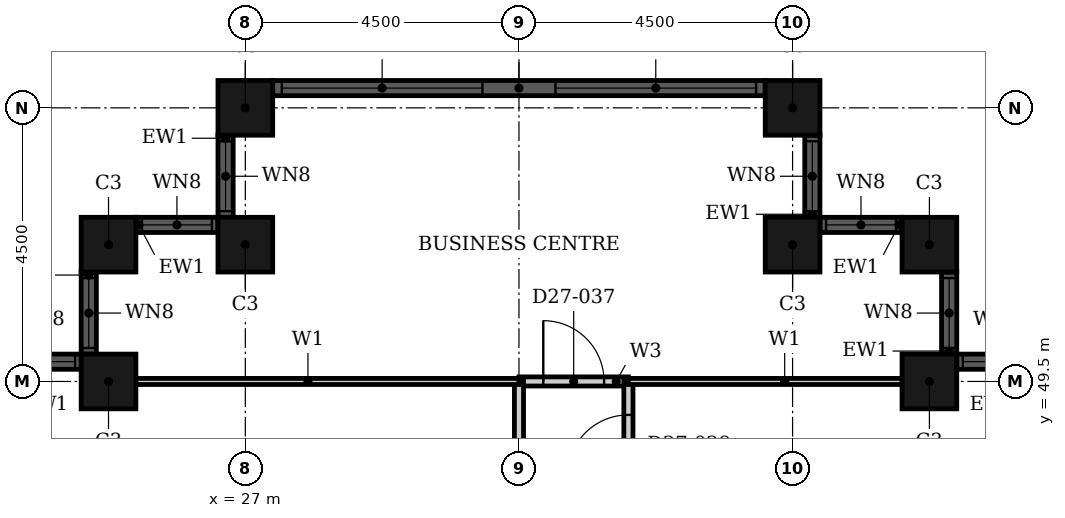
"""IFC4 building model, lengths in metres.
Left out: names, types, materials, properties, quantities, classifications, styles, units other than length and angle.
Written with IfcOpenShell. Run it as: python <this file> out.ifc"""

import sys

from ifc_helpers import new_model, si_unit, direction, frame, frame_2d, origin, origin_2d, place, context, subcontext, project, spatial, rectangle, hollow_rectangle, extrude, element, fill, save


model = new_model("IFC4")
c1 = context("Model", 3, precision=1e-05, world=origin(), true_north=direction((0.0, 1.0)))
c2 = subcontext(c1, "Body", "Model", "MODEL_VIEW")
j1 = project(units=[si_unit("LENGTHUNIT", "METRE"), si_unit("PLANEANGLEUNIT", "RADIAN")], contexts=[c1])
p1 = place(None, origin())
s1 = spatial("IfcSite", under=j1, at=p1, CompositionType="ELEMENT")
p2 = place(p1, origin())
s2 = spatial("IfcBuilding", under=s1, at=p2, CompositionType="ELEMENT")
p3 = place(p2, frame((0.0, 0.0, 111.6)))
s3 = spatial("IfcBuildingStorey", under=s2, at=p3, CompositionType="ELEMENT", Elevation=111.6)
for number, where, z_axis, x_axis in (
    (1, (38.25, 49.5, 0.0), (0.0, 0.0, 1.0), (1.0, 0.0, 0.0)),
    (2, (38.25, 51.75, 0.0), (0.0, 0.0, 1.0), (1.0, 0.0, 0.0)),
    (3, (36.0, 51.75, 0.0), (0.0, 0.0, 1.0), (1.0, 0.0, 0.0)),
    (4, (36.0, 54.0, 0.0), (0.0, 0.0, 1.0), (1.0, 0.0, 0.0)),
    (5, (27.0, 54.0, 0.0), (0.0, 0.0, 1.0), (1.0, 0.0, 0.0)),
    (6, (27.0, 51.75, 0.0), (0.0, 0.0, 1.0), (1.0, 0.0, 0.0)),
    (7, (24.75, 51.75, 0.0), (0.0, 0.0, 1.0), (1.0, 0.0, 0.0)),
    (8, (24.75, 49.5, 0.0), (0.0, 0.0, 1.0), (1.0, 0.0, 0.0)),
):
    element("IfcColumn", number, at=place(p3, frame(where, z_axis=z_axis, x_axis=x_axis)), inside=s3, PredefinedType="COLUMN", context=c2, shape_type="SweptSolid", body=[
        extrude(hollow_rectangle(XDim=0.9, YDim=0.9, WallThickness=0.028, at=origin_2d()), origin(), (0.0, 0.0, 1.0), 3.6),
    ])
p4 = place(p3, frame((40.05, 49.825, 0.0), z_axis=(0.0, 0.0, 1.0), x_axis=(-1.0, 0.0, 0.0)))
e9 = element("IfcWall", 9, at=p4, inside=s3, PredefinedType="SOLIDWALL", context=c2, shape_type="SweptSolid", body=[
    extrude(rectangle(XDim=1.35, YDim=0.25, at=frame_2d((0.675, 0.0))), origin(), (0.0, 0.0, 1.0), 3.6),
])
p5 = place(p4, frame((0.1, 0.0, 0.9)))
e10 = element("IfcOpeningElement", 10, at=p5, cuts=e9, PredefinedType="OPENING", context=c2, shape_type="SweptSolid", body=[
    extrude(rectangle(XDim=1.15, YDim=2.08, at=frame_2d((0.575, 1.04))), frame((0.0, 0.135, 0.0), z_axis=(0.0, -1.0, 0.0), x_axis=(1.0, 0.0, 0.0)), (0.0, 0.0, 1.0), 0.27),
])
p6 = place(p3, frame((38.575, 49.95, 0.0), z_axis=(0.0, 0.0, 1.0), x_axis=(0.0, 1.0, 0.0)))
e11 = element("IfcWall", 11, at=p6, inside=s3, PredefinedType="SOLIDWALL", context=c2, shape_type="SweptSolid", body=[
    extrude(rectangle(XDim=1.35, YDim=0.25, at=frame_2d((0.675, 0.0))), origin(), (0.0, 0.0, 1.0), 3.6),
])
p7 = place(p6, frame((0.1, 0.0, 0.9)))
e12 = element("IfcOpeningElement", 12, at=p7, cuts=e11, PredefinedType="OPENING", context=c2, shape_type="SweptSolid", body=[
    extrude(rectangle(XDim=1.15, YDim=2.08, at=frame_2d((0.575, 1.04))), frame((0.0, 0.135, 0.0), z_axis=(0.0, -1.0, 0.0), x_axis=(1.0, 0.0, 0.0)), (0.0, 0.0, 1.0), 0.27),
])
p8 = place(p3, frame((37.8, 52.075, 0.0), z_axis=(0.0, 0.0, 1.0), x_axis=(-1.0, 0.0, 0.0)))
e13 = element("IfcWall", 13, at=p8, inside=s3, PredefinedType="SOLIDWALL", context=c2, shape_type="SweptSolid", body=[
    extrude(rectangle(XDim=1.35, YDim=0.25, at=frame_2d((0.675, 0.0))), origin(), (0.0, 0.0, 1.0), 3.6),
])
p9 = place(p8, frame((0.1, 0.0, 0.9)))
e14 = element("IfcOpeningElement", 14, at=p9, cuts=e13, PredefinedType="OPENING", context=c2, shape_type="SweptSolid", body=[
    extrude(rectangle(XDim=1.15, YDim=2.08, at=frame_2d((0.575, 1.04))), frame((0.0, 0.135, 0.0), z_axis=(0.0, -1.0, 0.0), x_axis=(1.0, 0.0, 0.0)), (0.0, 0.0, 1.0), 0.27),
])
p10 = place(p3, frame((36.325, 52.2, 0.0), z_axis=(0.0, 0.0, 1.0), x_axis=(0.0, 1.0, 0.0)))
e15 = element("IfcWall", 15, at=p10, inside=s3, PredefinedType="SOLIDWALL", context=c2, shape_type="SweptSolid", body=[
    extrude(rectangle(XDim=1.35, YDim=0.25, at=frame_2d((0.675, 0.0))), origin(), (0.0, 0.0, 1.0), 3.6),
])
p11 = place(p10, frame((0.1, 0.0, 0.9)))
e16 = element("IfcOpeningElement", 16, at=p11, cuts=e15, PredefinedType="OPENING", context=c2, shape_type="SweptSolid", body=[
    extrude(rectangle(XDim=1.15, YDim=2.08, at=frame_2d((0.575, 1.04))), frame((0.0, 0.135, 0.0), z_axis=(0.0, -1.0, 0.0), x_axis=(1.0, 0.0, 0.0)), (0.0, 0.0, 1.0), 0.27),
])
p12 = place(p3, frame((35.55, 54.325, 0.0), z_axis=(0.0, 0.0, 1.0), x_axis=(-1.0, 0.0, 0.0)))
e17 = element("IfcWall", 17, at=p12, inside=s3, PredefinedType="SOLIDWALL", context=c2, shape_type="SweptSolid", body=[
    extrude(rectangle(XDim=8.1, YDim=0.25, at=frame_2d((4.05, 0.0))), origin(), (0.0, 0.0, 1.0), 3.6),
])
p13 = place(p12, frame((0.15, 0.0, 0.9)))
e18 = element("IfcOpeningElement", 18, at=p13, cuts=e17, PredefinedType="OPENING", context=c2, shape_type="SweptSolid", body=[
    extrude(rectangle(XDim=3.3, YDim=2.08, at=frame_2d((1.65, 1.04))), frame((0.0, 0.135, 0.0), z_axis=(0.0, -1.0, 0.0), x_axis=(1.0, 0.0, 0.0)), (0.0, 0.0, 1.0), 0.27),
])
p14 = place(p12, frame((4.65, 0.0, 0.9)))
e19 = element("IfcOpeningElement", 19, at=p14, cuts=e17, PredefinedType="OPENING", context=c2, shape_type="SweptSolid", body=[
    extrude(rectangle(XDim=3.3, YDim=2.08, at=frame_2d((1.65, 1.04))), frame((0.0, 0.135, 0.0), z_axis=(0.0, -1.0, 0.0), x_axis=(1.0, 0.0, 0.0)), (0.0, 0.0, 1.0), 0.27),
])
p15 = place(p3, frame((26.675, 53.55, 0.0), z_axis=(0.0, 0.0, 1.0), x_axis=(0.0, -1.0, 0.0)))
e20 = element("IfcWall", 20, at=p15, inside=s3, PredefinedType="SOLIDWALL", context=c2, shape_type="SweptSolid", body=[
    extrude(rectangle(XDim=1.35, YDim=0.25, at=frame_2d((0.675, 0.0))), origin(), (0.0, 0.0, 1.0), 3.6),
])
p16 = place(p15, frame((0.1, 0.0, 0.9)))
e21 = element("IfcOpeningElement", 21, at=p16, cuts=e20, PredefinedType="OPENING", context=c2, shape_type="SweptSolid", body=[
    extrude(rectangle(XDim=1.15, YDim=2.08, at=frame_2d((0.575, 1.04))), frame((0.0, 0.135, 0.0), z_axis=(0.0, -1.0, 0.0), x_axis=(1.0, 0.0, 0.0)), (0.0, 0.0, 1.0), 0.27),
])
p17 = place(p3, frame((26.55, 52.075, 0.0), z_axis=(0.0, 0.0, 1.0), x_axis=(-1.0, 0.0, 0.0)))
e22 = element("IfcWall", 22, at=p17, inside=s3, PredefinedType="SOLIDWALL", context=c2, shape_type="SweptSolid", body=[
    extrude(rectangle(XDim=1.35, YDim=0.25, at=frame_2d((0.675, 0.0))), origin(), (0.0, 0.0, 1.0), 3.6),
])
p18 = place(p17, frame((0.1, 0.0, 0.9)))
e23 = element("IfcOpeningElement", 23, at=p18, cuts=e22, PredefinedType="OPENING", context=c2, shape_type="SweptSolid", body=[
    extrude(rectangle(XDim=1.15, YDim=2.08, at=frame_2d((0.575, 1.04))), frame((0.0, 0.135, 0.0), z_axis=(0.0, -1.0, 0.0), x_axis=(1.0, 0.0, 0.0)), (0.0, 0.0, 1.0), 0.27),
])
p19 = place(p3, frame((24.425, 51.3, 0.0), z_axis=(0.0, 0.0, 1.0), x_axis=(0.0, -1.0, 0.0)))
e24 = element("IfcWall", 24, at=p19, inside=s3, PredefinedType="SOLIDWALL", context=c2, shape_type="SweptSolid", body=[
    extrude(rectangle(XDim=1.35, YDim=0.25, at=frame_2d((0.675, 0.0))), origin(), (0.0, 0.0, 1.0), 3.6),
])
p20 = place(p19, frame((0.1, 0.0, 0.9)))
e25 = element("IfcOpeningElement", 25, at=p20, cuts=e24, PredefinedType="OPENING", context=c2, shape_type="SweptSolid", body=[
    extrude(rectangle(XDim=1.15, YDim=2.08, at=frame_2d((0.575, 1.04))), frame((0.0, 0.135, 0.0), z_axis=(0.0, -1.0, 0.0), x_axis=(1.0, 0.0, 0.0)), (0.0, 0.0, 1.0), 0.27),
])
p21 = place(p3, frame((24.3, 49.825, 0.0), z_axis=(0.0, 0.0, 1.0), x_axis=(-1.0, 0.0, 0.0)))
e26 = element("IfcWall", 26, at=p21, inside=s3, PredefinedType="SOLIDWALL", context=c2, shape_type="SweptSolid", body=[
    extrude(rectangle(XDim=1.35, YDim=0.25, at=frame_2d((0.675, 0.0))), origin(), (0.0, 0.0, 1.0), 3.6),
])
p22 = place(p21, frame((0.1, 0.0, 0.9)))
e27 = element("IfcOpeningElement", 27, at=p22, cuts=e26, PredefinedType="OPENING", context=c2, shape_type="SweptSolid", body=[
    extrude(rectangle(XDim=1.15, YDim=2.08, at=frame_2d((0.575, 1.04))), frame((0.0, 0.135, 0.0), z_axis=(0.0, -1.0, 0.0), x_axis=(1.0, 0.0, 0.0)), (0.0, 0.0, 1.0), 0.27),
])
p23 = place(p3, frame((31.5, 49.5, 0.0), z_axis=(0.0, 0.0, 1.0), x_axis=(1.0, 0.0, 0.0)))
e28 = element("IfcWall", 28, at=p23, inside=s3, PredefinedType="PARTITIONING", context=c2, shape_type="SweptSolid", body=[
    extrude(rectangle(XDim=1.8, YDim=0.15, at=frame_2d((0.9, 0.0))), origin(), (0.0, 0.0, 1.0), 3.3),
])
p24 = place(p23, frame((0.4, 0.0, 0.0)))
e29 = element("IfcOpeningElement", 29, at=p24, cuts=e28, PredefinedType="OPENING", context=c2, shape_type="SweptSolid", body=[
    extrude(rectangle(XDim=1.0, YDim=2.1, at=frame_2d((0.5, 1.05))), frame((0.0, 0.085, 0.0), z_axis=(0.0, -1.0, 0.0), x_axis=(1.0, 0.0, 0.0)), (0.0, 0.0, 1.0), 0.17),
])
p25 = place(p3, frame((31.5, 33.3, 0.0), z_axis=(0.0, 0.0, 1.0), x_axis=(0.0, 1.0, 0.0)))
e30 = element("IfcWall", 30, at=p25, inside=s3, PredefinedType="PARTITIONING", context=c2, shape_type="SweptSolid", body=[
    extrude(rectangle(XDim=16.2, YDim=0.15, at=frame_2d((8.1, 0.0))), origin(), (0.0, 0.0, 1.0), 2.58),
])
p26 = place(p25, frame((8.95, 0.0, 0.0)))
e31 = element("IfcOpeningElement", 31, at=p26, cuts=e30, PredefinedType="OPENING", context=c2, shape_type="SweptSolid", body=[
    extrude(rectangle(XDim=1.0, YDim=2.1, at=frame_2d((0.5, 1.05))), frame((0.0, 0.085, 0.0), z_axis=(0.0, -1.0, 0.0), x_axis=(1.0, 0.0, 0.0)), (0.0, 0.0, 1.0), 0.17),
])
p27 = place(p3, frame((33.3, 33.3, 0.0), z_axis=(0.0, 0.0, 1.0), x_axis=(0.0, 1.0, 0.0)))
e32 = element("IfcWall", 32, at=p27, inside=s3, PredefinedType="PARTITIONING", context=c2, shape_type="SweptSolid", body=[
    extrude(rectangle(XDim=16.2, YDim=0.15, at=frame_2d((8.1, 0.0))), origin(), (0.0, 0.0, 1.0), 3.3),
])
p28 = place(p27, frame((10.15, 0.0, 0.0)))
e33 = element("IfcOpeningElement", 33, at=p28, cuts=e32, PredefinedType="OPENING", context=c2, shape_type="SweptSolid", body=[
    extrude(rectangle(XDim=1.0, YDim=2.1, at=frame_2d((0.5, 1.05))), frame((0.0, 0.085, 0.0), z_axis=(0.0, -1.0, 0.0), x_axis=(1.0, 0.0, 0.0)), (0.0, 0.0, 1.0), 0.17),
])
p29 = place(p27, frame((14.65, 0.0, 0.0)))
e34 = element("IfcOpeningElement", 34, at=p29, cuts=e32, PredefinedType="OPENING", context=c2, shape_type="SweptSolid", body=[
    extrude(rectangle(XDim=1.0, YDim=2.1, at=frame_2d((0.5, 1.05))), frame((0.0, 0.085, 0.0), z_axis=(0.0, -1.0, 0.0), x_axis=(1.0, 0.0, 0.0)), (0.0, 0.0, 1.0), 0.17),
])
p30 = place(p3, frame((33.3, 49.5, 0.0), z_axis=(0.0, 0.0, 1.0), x_axis=(1.0, 0.0, 0.0)))
e35 = element("IfcWall", 35, at=p30, inside=s3, PredefinedType="PARTITIONING", context=c2, shape_type="SweptSolid", body=[
    extrude(rectangle(XDim=5.14, YDim=0.1, at=frame_2d((2.57, 0.0))), origin(), (0.0, 0.0, 1.0), 3.3),
])
p31 = place(p3, frame((24.56, 49.5, 0.0), z_axis=(0.0, 0.0, 1.0), x_axis=(1.0, 0.0, 0.0)))
e36 = element("IfcWall", 36, at=p31, inside=s3, PredefinedType="PARTITIONING", context=c2, shape_type="SweptSolid", body=[
    extrude(rectangle(XDim=6.94, YDim=0.1, at=frame_2d((3.47, 0.0))), origin(), (0.0, 0.0, 1.0), 3.3),
])
p32 = place(p5, origin())
e37 = element("IfcWindow", 37, at=p32, inside=s3, PartitioningType="SINGLE_PANEL", PredefinedType="WINDOW", context=c2, shape_type="SweptSolid", body=[
    extrude(rectangle(XDim=1.15, YDim=2.08, at=frame_2d((0.575, 1.04))), frame((0.0, 0.03, 0.0), z_axis=(0.0, -1.0, 0.0), x_axis=(1.0, 0.0, 0.0)), (0.0, 0.0, 1.0), 0.06),
])
fill(e10, e37)
p33 = place(p7, origin())
e38 = element("IfcWindow", 38, at=p33, inside=s3, PartitioningType="SINGLE_PANEL", PredefinedType="WINDOW", context=c2, shape_type="SweptSolid", body=[
    extrude(rectangle(XDim=1.15, YDim=2.08, at=frame_2d((0.575, 1.04))), frame((0.0, 0.03, 0.0), z_axis=(0.0, -1.0, 0.0), x_axis=(1.0, 0.0, 0.0)), (0.0, 0.0, 1.0), 0.06),
])
fill(e12, e38)
p34 = place(p9, origin())
e39 = element("IfcWindow", 39, at=p34, inside=s3, PartitioningType="SINGLE_PANEL", PredefinedType="WINDOW", context=c2, shape_type="SweptSolid", body=[
    extrude(rectangle(XDim=1.15, YDim=2.08, at=frame_2d((0.575, 1.04))), frame((0.0, 0.03, 0.0), z_axis=(0.0, -1.0, 0.0), x_axis=(1.0, 0.0, 0.0)), (0.0, 0.0, 1.0), 0.06),
])
fill(e14, e39)
p35 = place(p11, origin())
e40 = element("IfcWindow", 40, at=p35, inside=s3, PartitioningType="SINGLE_PANEL", PredefinedType="WINDOW", context=c2, shape_type="SweptSolid", body=[
    extrude(rectangle(XDim=1.15, YDim=2.08, at=frame_2d((0.575, 1.04))), frame((0.0, 0.03, 0.0), z_axis=(0.0, -1.0, 0.0), x_axis=(1.0, 0.0, 0.0)), (0.0, 0.0, 1.0), 0.06),
])
fill(e16, e40)
p36 = place(p13, origin())
e41 = element("IfcWindow", 41, at=p36, inside=s3, PartitioningType="SINGLE_PANEL", PredefinedType="WINDOW", context=c2, shape_type="SweptSolid", body=[
    extrude(rectangle(XDim=3.3, YDim=2.08, at=frame_2d((1.65, 1.04))), frame((0.0, 0.03, 0.0), z_axis=(0.0, -1.0, 0.0), x_axis=(1.0, 0.0, 0.0)), (0.0, 0.0, 1.0), 0.06),
])
fill(e18, e41)
p37 = place(p14, origin())
e42 = element("IfcWindow", 42, at=p37, inside=s3, PartitioningType="SINGLE_PANEL", PredefinedType="WINDOW", context=c2, shape_type="SweptSolid", body=[
    extrude(rectangle(XDim=3.3, YDim=2.08, at=frame_2d((1.65, 1.04))), frame((0.0, 0.03, 0.0), z_axis=(0.0, -1.0, 0.0), x_axis=(1.0, 0.0, 0.0)), (0.0, 0.0, 1.0), 0.06),
])
fill(e19, e42)
p38 = place(p16, origin())
e43 = element("IfcWindow", 43, at=p38, inside=s3, PartitioningType="SINGLE_PANEL", PredefinedType="WINDOW", context=c2, shape_type="SweptSolid", body=[
    extrude(rectangle(XDim=1.15, YDim=2.08, at=frame_2d((0.575, 1.04))), frame((0.0, 0.03, 0.0), z_axis=(0.0, -1.0, 0.0), x_axis=(1.0, 0.0, 0.0)), (0.0, 0.0, 1.0), 0.06),
])
fill(e21, e43)
p39 = place(p18, origin())
e44 = element("IfcWindow", 44, at=p39, inside=s3, PartitioningType="SINGLE_PANEL", PredefinedType="WINDOW", context=c2, shape_type="SweptSolid", body=[
    extrude(rectangle(XDim=1.15, YDim=2.08, at=frame_2d((0.575, 1.04))), frame((0.0, 0.03, 0.0), z_axis=(0.0, -1.0, 0.0), x_axis=(1.0, 0.0, 0.0)), (0.0, 0.0, 1.0), 0.06),
])
fill(e23, e44)
p40 = place(p20, origin())
e45 = element("IfcWindow", 45, at=p40, inside=s3, PartitioningType="SINGLE_PANEL", PredefinedType="WINDOW", context=c2, shape_type="SweptSolid", body=[
    extrude(rectangle(XDim=1.15, YDim=2.08, at=frame_2d((0.575, 1.04))), frame((0.0, 0.03, 0.0), z_axis=(0.0, -1.0, 0.0), x_axis=(1.0, 0.0, 0.0)), (0.0, 0.0, 1.0), 0.06),
])
fill(e25, e45)
p41 = place(p22, origin())
e46 = element("IfcWindow", 46, at=p41, inside=s3, PartitioningType="SINGLE_PANEL", PredefinedType="WINDOW", context=c2, shape_type="SweptSolid", body=[
    extrude(rectangle(XDim=1.15, YDim=2.08, at=frame_2d((0.575, 1.04))), frame((0.0, 0.03, 0.0), z_axis=(0.0, -1.0, 0.0), x_axis=(1.0, 0.0, 0.0)), (0.0, 0.0, 1.0), 0.06),
])
fill(e27, e46)
p42 = place(p29, origin())
e47 = element("IfcDoor", 47, at=p42, inside=s3, OperationType="SINGLE_SWING_RIGHT", PredefinedType="DOOR", context=c2, shape_type="SweptSolid", body=[
    extrude(rectangle(XDim=1.0, YDim=2.1, at=frame_2d((0.5, 1.05))), frame((0.0, 0.025, 0.0), z_axis=(0.0, -1.0, 0.0), x_axis=(1.0, 0.0, 0.0)), (0.0, 0.0, 1.0), 0.05),
])
fill(e34, e47)
p43 = place(p24, origin())
e48 = element("IfcDoor", 48, at=p43, inside=s3, OperationType="SINGLE_SWING_LEFT", PredefinedType="DOOR", context=c2, shape_type="SweptSolid", body=[
    extrude(rectangle(XDim=1.0, YDim=2.1, at=frame_2d((0.5, 1.05))), frame((0.0, 0.025, 0.0), z_axis=(0.0, -1.0, 0.0), x_axis=(1.0, 0.0, 0.0)), (0.0, 0.0, 1.0), 0.05),
])
fill(e29, e48)
save(model, sys.argv[1])
